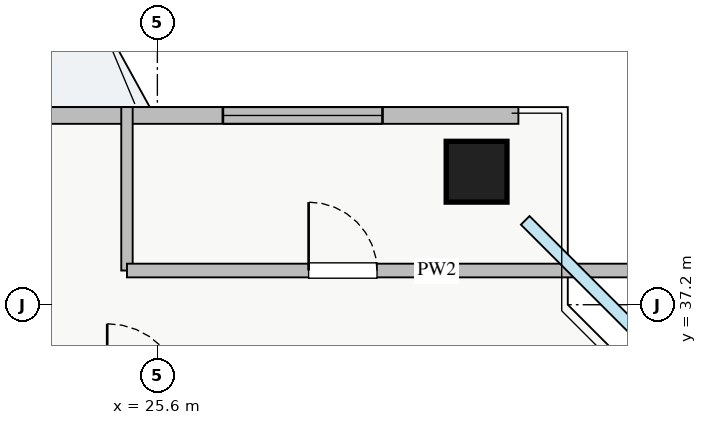
"""IFC4 building model, lengths in metres.
Left out: names, types, materials, properties, quantities, classifications, styles, units other than length and angle.
Written with IfcOpenShell. Run it as: python <this file> out.ifc"""

import sys

from ifc_helpers import new_model, si_unit, direction, frame, frame_2d, origin, origin_2d, place, context, subcontext, project, spatial, rectangle, extrude, source, transform, mapped, element, fill, save


model = new_model("IFC4")
c1 = context("Model", 3, precision=1e-05, world=origin(), true_north=direction((0.0, 1.0)))
c2 = subcontext(c1, "Body", "Model", "MODEL_VIEW")
j1 = project(units=[si_unit("LENGTHUNIT", "METRE"), si_unit("PLANEANGLEUNIT", "RADIAN")], contexts=[c1])
p1 = place(None, origin())
s1 = spatial("IfcSite", under=j1, at=p1, CompositionType="ELEMENT")
p2 = place(p1, origin())
s2 = spatial("IfcBuilding", under=s1, at=p2, CompositionType="ELEMENT")
p3 = place(p2, frame((0.0, 0.0, 229.5)))
s3 = spatial("IfcBuildingStorey", under=s2, at=p3, CompositionType="ELEMENT", Elevation=229.5)
m1 = source(origin(), c2, "Body", "SweptSolid", [
    extrude(rectangle(XDim=0.8, YDim=0.8, at=origin_2d()), origin(), (0.0, 0.0, 1.0), 3.25),
])
p4 = place(p3, frame((29.8, 38.95, 0.0), z_axis=(0.0, 0.0, 1.0), x_axis=(1.0, 0.0, 0.0)))
e1 = element("IfcColumn", 1, at=p4, inside=s3, PredefinedType="COLUMN", context=c2, shape_type="MappedRepresentation", body=[
    mapped(m1, transform((0.0, 0.0, 0.0), x_axis=(1.0, 0.0, 0.0), y_axis=(0.0, 1.0, 0.0), z_axis=(0.0, 0.0, 1.0), scale=1.0)),
])
p5 = place(p3, frame((7.65, 39.69, 0.0), z_axis=(0.0, 0.0, 1.0), x_axis=(1.0, 0.0, 0.0)))
e2 = element("IfcWall", 2, at=p5, inside=s3, PredefinedType="STANDARD", context=c2, shape_type="SweptSolid", body=[
    extrude(rectangle(XDim=22.7, YDim=0.22, at=frame_2d((11.35, 0.0))), origin(), (0.0, 0.0, 1.0), 2.57),
])
p6 = place(p5, frame((12.2, 0.0, 0.0)))
e3 = element("IfcOpeningElement", 3, at=p6, cuts=e2, PredefinedType="OPENING", context=c2, shape_type="SweptSolid", body=[
    extrude(rectangle(XDim=1.2, YDim=2.1, at=frame_2d((0.6, 1.05))), frame((0.0, 0.12, 0.0), z_axis=(0.0, -1.0, 0.0), x_axis=(1.0, 0.0, 0.0)), (0.0, 0.0, 1.0), 0.24),
])
p7 = place(p5, frame((1.637, 0.0, 0.9)))
e4 = element("IfcOpeningElement", 4, at=p7, cuts=e2, PredefinedType="OPENING", context=c2, shape_type="SweptSolid", body=[
    extrude(rectangle(XDim=2.4, YDim=1.48, at=frame_2d((1.2, 0.74))), frame((0.0, 0.12, 0.0), z_axis=(0.0, -1.0, 0.0), x_axis=(1.0, 0.0, 0.0)), (0.0, 0.0, 1.0), 0.24),
])
p8 = place(p5, frame((7.612, 0.0, 0.9)))
e5 = element("IfcOpeningElement", 5, at=p8, cuts=e2, PredefinedType="OPENING", context=c2, shape_type="SweptSolid", body=[
    extrude(rectangle(XDim=1.8, YDim=1.45, at=frame_2d((0.9, 0.725))), frame((0.0, 0.12, 0.0), z_axis=(0.0, -1.0, 0.0), x_axis=(1.0, 0.0, 0.0)), (0.0, 0.0, 1.0), 0.24),
])
p9 = place(p5, frame((18.812, 0.0, 0.9)))
e6 = element("IfcOpeningElement", 6, at=p9, cuts=e2, PredefinedType="OPENING", context=c2, shape_type="SweptSolid", body=[
    extrude(rectangle(XDim=2.1, YDim=1.48, at=frame_2d((1.05, 0.74))), frame((0.0, 0.12, 0.0), z_axis=(0.0, -1.0, 0.0), x_axis=(1.0, 0.0, 0.0)), (0.0, 0.0, 1.0), 0.24),
])
p10 = place(p3, frame((25.2, 37.65, 0.0), z_axis=(0.0, 0.0, 1.0), x_axis=(0.0, 1.0, 0.0)))
e7 = element("IfcWall", 7, at=p10, inside=s3, PredefinedType="PARTITIONING", context=c2, shape_type="SweptSolid", body=[
    extrude(rectangle(XDim=2.15, YDim=0.15, at=frame_2d((1.075, 0.0))), origin(), (0.0, 0.0, 1.0), 3.03),
])
p11 = place(p3, frame((25.2, 37.65, 0.0), z_axis=(0.0, 0.0, 1.0), x_axis=(1.0, 0.0, 0.0)))
e8 = element("IfcWall", 8, at=p11, inside=s3, PredefinedType="PARTITIONING", context=c2, shape_type="SweptSolid", body=[
    extrude(rectangle(XDim=7.25, YDim=0.18, at=frame_2d((3.625, 0.0))), origin(), (0.0, 0.0, 1.0), 3.03),
])
p12 = place(p11, frame((2.39, 0.0, 0.0)))
e9 = element("IfcOpeningElement", 9, at=p12, cuts=e8, PredefinedType="OPENING", context=c2, shape_type="SweptSolid", body=[
    extrude(rectangle(XDim=0.9, YDim=2.05, at=frame_2d((0.45, 1.025))), frame((0.0, 0.1, 0.0), z_axis=(0.0, -1.0, 0.0), x_axis=(1.0, 0.0, 0.0)), (0.0, 0.0, 1.0), 0.2),
])
m2 = source(origin(), c2, "Body", "SweptSolid", [
    extrude(rectangle(XDim=2.1, YDim=1.48, at=frame_2d((1.05, 0.74))), frame((0.0, 0.03, 0.0), z_axis=(0.0, -1.0, 0.0), x_axis=(1.0, 0.0, 0.0)), (0.0, 0.0, 1.0), 0.06),
])
p13 = place(p9, origin())
e10 = element("IfcWindow", 10, at=p13, inside=s3, PartitioningType="TRIPLE_PANEL_VERTICAL", PredefinedType="WINDOW", context=c2, shape_type="MappedRepresentation", body=[
    mapped(m2, transform((0.0, 0.0, 0.0), x_axis=(1.0, 0.0, 0.0), y_axis=(0.0, 1.0, 0.0), z_axis=(0.0, 0.0, 1.0), scale=1.0)),
])
fill(e6, e10)
m3 = source(origin(), c2, "Body", "SweptSolid", [
    extrude(rectangle(XDim=0.9, YDim=2.05, at=frame_2d((0.45, 1.025))), frame((0.0, 0.025, 0.0), z_axis=(0.0, -1.0, 0.0), x_axis=(1.0, 0.0, 0.0)), (0.0, 0.0, 1.0), 0.05),
])
p14 = place(p12, origin())
e11 = element("IfcDoor", 11, at=p14, inside=s3, OperationType="SINGLE_SWING_LEFT", PredefinedType="DOOR", context=c2, shape_type="MappedRepresentation", body=[
    mapped(m3, transform((0.0, 0.0, 0.0), x_axis=(1.0, 0.0, 0.0), y_axis=(0.0, 1.0, 0.0), z_axis=(0.0, 0.0, 1.0), scale=1.0)),
])
fill(e9, e11)
save(model, sys.argv[1])
